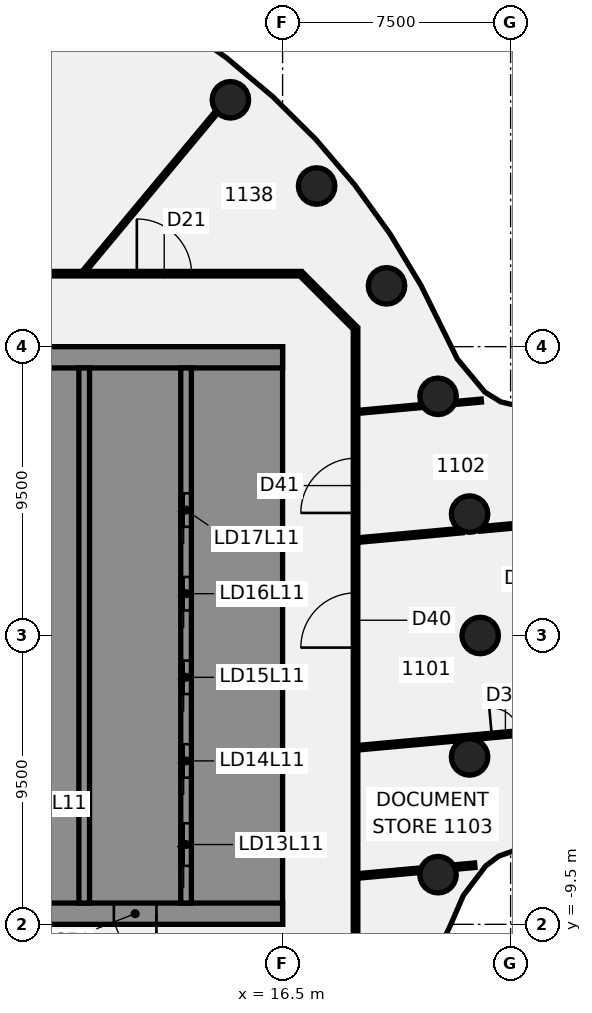
"""IFC4 building model, lengths in metres.
Left out: names, types, materials, properties, quantities, classifications, styles, units other than length and angle.
Written with IfcOpenShell. Run it as: python <this file> out.ifc"""

import sys

from ifc_helpers import new_model, si_unit, direction, frame, frame_2d, origin, origin_2d, place, context, subcontext, project, spatial, polyline, rectangle, circle, outline, extrude, element, fill, save


model = new_model("IFC4")
c1 = context("Model", 3, precision=1e-05, world=origin(), true_north=direction((0.0, 1.0)))
c2 = subcontext(c1, "Body", "Model", "MODEL_VIEW")
j1 = project(units=[si_unit("LENGTHUNIT", "METRE"), si_unit("PLANEANGLEUNIT", "RADIAN")], contexts=[c1])
p1 = place(None, origin())
s1 = spatial("IfcSite", under=j1, at=p1, CompositionType="ELEMENT")
p2 = place(p1, origin())
s2 = spatial("IfcBuilding", under=s1, at=p2, CompositionType="ELEMENT")
p3 = place(p2, frame((0.0, 0.0, 52.75)))
s3 = spatial("IfcBuildingStorey", under=s2, at=p3, CompositionType="ELEMENT", Elevation=52.75)
for number, where, z_axis, x_axis in (
    (1, (23.0, 0.0, -0.14), (0.0, 0.0, 1.0), (1.0, 0.0, 0.0)),
    (2, (22.651, 3.994, -0.14), (0.0, 0.0, 1.0), (1.0, 0.0, 0.0)),
    (3, (21.613, 7.866, -0.14), (0.0, 0.0, 1.0), (1.0, 0.0, 0.0)),
    (4, (19.919, 11.5, -0.14), (0.0, 0.0, 1.0), (1.0, 0.0, 0.0)),
    (5, (17.619, 14.784, -0.14), (0.0, 0.0, 1.0), (1.0, 0.0, 0.0)),
    (6, (14.784, 17.619, -0.14), (0.0, 0.0, 1.0), (1.0, 0.0, 0.0)),
    (7, (21.613, -7.866, -0.14), (0.0, 0.0, 1.0), (1.0, 0.0, 0.0)),
    (8, (22.651, -3.994, -0.14), (0.0, 0.0, 1.0), (1.0, 0.0, 0.0)),
):
    element("IfcColumn", number, at=place(p3, frame(where, z_axis=z_axis, x_axis=x_axis)), inside=s3, PredefinedType="COLUMN", context=c2, shape_type="SweptSolid", body=[
        extrude(circle(Radius=0.6, at=origin_2d()), origin(), (0.0, 0.0, 1.0), 3.75),
    ])
p4 = place(p3, frame((17.128, 11.872, 0.0), z_axis=(0.0, 0.0, 1.0), x_axis=(0.707106781187, -0.707106781187, 0.0)))
e9 = element("IfcWall", 9, at=p4, inside=s3, PredefinedType="PARTITIONING", context=c2, shape_type="SweptSolid", body=[
    extrude(rectangle(XDim=2.465, YDim=0.15, at=frame_2d((1.232, 0.0))), origin(), (0.0, 0.0, 1.0), 3.01),
])
p5 = place(p3, frame((-17.065, 11.9, 0.0), z_axis=(0.0, 0.0, 1.0), x_axis=(1.0, 0.0, 0.0)))
e10 = element("IfcWall", 10, at=p5, inside=s3, PredefinedType="PARTITIONING", context=c2, shape_type="SweptSolid", body=[
    extrude(rectangle(XDim=34.165, YDim=0.15, at=frame_2d((17.083, 0.0))), origin(), (0.0, 0.0, 1.0), 3.01),
])
p6 = place(p5, frame((17.124, 0.0, 0.0)))
e11 = element("IfcOpeningElement", 11, at=p6, cuts=e10, PredefinedType="OPENING", context=c2, shape_type="SweptSolid", body=[
    extrude(rectangle(XDim=1.8, YDim=2.1, at=frame_2d((0.9, 1.05))), frame((0.0, 0.085, 0.0), z_axis=(0.0, -1.0, 0.0), x_axis=(1.0, 0.0, 0.0)), (0.0, 0.0, 1.0), 0.17),
])
p7 = place(p5, frame((28.771, 0.0, 0.0)))
e12 = element("IfcOpeningElement", 12, at=p7, cuts=e10, PredefinedType="OPENING", context=c2, shape_type="SweptSolid", body=[
    extrude(rectangle(XDim=1.8, YDim=2.1, at=frame_2d((0.9, 1.05))), frame((0.0, 0.085, 0.0), z_axis=(0.0, -1.0, 0.0), x_axis=(1.0, 0.0, 0.0)), (0.0, 0.0, 1.0), 0.17),
])
p8 = place(p5, frame((6.52, 0.0, 0.0)))
e13 = element("IfcOpeningElement", 13, at=p8, cuts=e10, PredefinedType="OPENING", context=c2, shape_type="SweptSolid", body=[
    extrude(rectangle(XDim=1.8, YDim=2.1, at=frame_2d((0.9, 1.05))), frame((0.0, 0.085, 0.0), z_axis=(0.0, -1.0, 0.0), x_axis=(1.0, 0.0, 0.0)), (0.0, 0.0, 1.0), 0.17),
])
p9 = place(p3, frame((18.965, -3.692, 0.0), z_axis=(0.0, 0.0, 1.0), x_axis=(0.995841773556, 0.091099736772, 0.0)))
e14 = element("IfcWall", 14, at=p9, inside=s3, PredefinedType="PARTITIONING", context=c2, shape_type="SweptSolid", body=[
    extrude(rectangle(XDim=7.064, YDim=0.15, at=frame_2d((3.532, 0.0))), origin(), (0.0, 0.0, 1.0), 3.01),
])
p10 = place(p9, frame((4.435, 0.0, 0.0)))
e15 = element("IfcOpeningElement", 15, at=p10, cuts=e14, PredefinedType="OPENING", context=c2, shape_type="SweptSolid", body=[
    extrude(rectangle(XDim=0.9, YDim=2.1, at=frame_2d((0.45, 1.05))), frame((0.0, 0.085, 0.0), z_axis=(0.0, -1.0, 0.0), x_axis=(1.0, 0.0, 0.0)), (0.0, 0.0, 1.0), 0.17),
])
p11 = place(p3, frame((18.965, 3.137, 0.0), z_axis=(0.0, 0.0, 1.0), x_axis=(0.995850755629, 0.091001497317, 0.0)))
e16 = element("IfcWall", 16, at=p11, inside=s3, PredefinedType="PARTITIONING", context=c2, shape_type="SweptSolid", body=[
    extrude(rectangle(XDim=3.45, YDim=0.15, at=frame_2d((1.725, 0.0))), origin(), (0.0, 0.0, 1.0), 3.01),
])
p12 = place(p3, frame((22.995, 3.505, 0.0), z_axis=(0.0, 0.0, 1.0), x_axis=(0.995847961982, 0.091032063676, 0.0)))
e17 = element("IfcWall", 17, at=p12, inside=s3, PredefinedType="PARTITIONING", context=c2, shape_type="SweptSolid", body=[
    extrude(rectangle(XDim=2.395, YDim=0.15, at=frame_2d((1.198, 0.0))), origin(), (0.0, 0.0, 1.0), 3.01),
])
p13 = place(p3, frame((18.96, 7.354, 0.0), z_axis=(0.0, 0.0, 1.0), x_axis=(0.995829556648, 0.091233185336, 0.0)))
e18 = element("IfcWall", 18, at=p13, inside=s3, PredefinedType="PARTITIONING", context=c2, shape_type="SweptSolid", body=[
    extrude(rectangle(XDim=2.146, YDim=0.1, at=frame_2d((1.073, 0.0))), origin(), (0.0, 0.0, 1.0), 3.01),
])
p14 = place(p3, frame((22.164, 7.647, 0.0), z_axis=(0.0, 0.0, 1.0), x_axis=(0.995831241369, 0.091214794378, 0.0)))
e19 = element("IfcWall", 19, at=p14, inside=s3, PredefinedType="PARTITIONING", context=c2, shape_type="SweptSolid", body=[
    extrude(rectangle(XDim=0.875, YDim=0.1, at=frame_2d((0.438, 0.0))), origin(), (0.0, 0.0, 1.0), 3.01),
])
p15 = place(p3, frame((18.965, -7.909, 0.0), z_axis=(0.0, 0.0, 1.0), x_axis=(0.995837392729, 0.091147612376, 0.0)))
e20 = element("IfcWall", 20, at=p15, inside=s3, PredefinedType="PARTITIONING", context=c2, shape_type="SweptSolid", body=[
    extrude(rectangle(XDim=2.087, YDim=0.15, at=frame_2d((1.043, 0.0))), origin(), (0.0, 0.0, 1.0), 3.01),
])
p16 = place(p3, frame((22.156, -7.617, 0.0), z_axis=(0.0, 0.0, 1.0), x_axis=(0.995860226183, 0.090897799237, 0.0)))
e21 = element("IfcWall", 21, at=p16, inside=s3, PredefinedType="PARTITIONING", context=c2, shape_type="SweptSolid", body=[
    extrude(rectangle(XDim=0.669, YDim=0.15, at=frame_2d((0.334, 0.0))), origin(), (0.0, 0.0, 1.0), 3.01),
])
p17 = place(p3, frame((9.979, 11.988, 0.0), z_axis=(0.0, 0.0, 1.0), x_axis=(0.639768706711, 0.768567499907, 0.0)))
e22 = element("IfcWall", 22, at=p17, inside=s3, PredefinedType="PARTITIONING", context=c2, shape_type="SweptSolid", body=[
    extrude(rectangle(XDim=6.818, YDim=0.1, at=frame_2d((3.409, 0.0))), origin(), (0.0, 0.0, 1.0), 3.01),
])
p18 = place(p3, frame((18.9, -10.1, 0.0), z_axis=(0.0, 0.0, 1.0), x_axis=(0.0, 1.0, 0.0)))
e23 = element("IfcWall", 23, at=p18, inside=s3, PredefinedType="PARTITIONING", context=c2, shape_type="SweptSolid", body=[
    extrude(rectangle(XDim=20.2, YDim=0.15, at=frame_2d((10.1, 0.0))), origin(), (0.0, 0.0, 1.0), 3.01),
])
p19 = place(p18, frame((9.702, 0.0, 0.0)))
e24 = element("IfcOpeningElement", 24, at=p19, cuts=e23, PredefinedType="OPENING", context=c2, shape_type="SweptSolid", body=[
    extrude(rectangle(XDim=1.8, YDim=2.1, at=frame_2d((0.9, 1.05))), frame((0.0, 0.085, 0.0), z_axis=(0.0, -1.0, 0.0), x_axis=(1.0, 0.0, 0.0)), (0.0, 0.0, 1.0), 0.17),
])
p20 = place(p18, frame((14.131, 0.0, 0.0)))
e25 = element("IfcOpeningElement", 25, at=p20, cuts=e23, PredefinedType="OPENING", context=c2, shape_type="SweptSolid", body=[
    extrude(rectangle(XDim=1.8, YDim=2.1, at=frame_2d((0.9, 1.05))), frame((0.0, 0.085, 0.0), z_axis=(0.0, -1.0, 0.0), x_axis=(1.0, 0.0, 0.0)), (0.0, 0.0, 1.0), 0.17),
])
p21 = place(p3, frame((16.5, -9.15, 0.0), z_axis=(0.0, 0.0, 1.0), x_axis=(-1.0, 0.0, 0.0)))
e26 = element("IfcWall", 26, at=p21, inside=s3, PredefinedType="SHEAR", context=c2, shape_type="SweptSolid", body=[
    extrude(rectangle(XDim=13.0, YDim=0.7, at=frame_2d((6.5, 0.0))), origin(), (0.0, 0.0, 1.0), 3.61),
])
p22 = place(p21, frame((4.15, 0.0, 0.0)))
e27 = element("IfcOpeningElement", 27, at=p22, cuts=e26, PredefinedType="OPENING", context=c2, shape_type="SweptSolid", body=[
    extrude(rectangle(XDim=1.4, YDim=2.1, at=frame_2d((0.7, 1.05))), frame((0.0, 0.36, 0.0), z_axis=(0.0, -1.0, 0.0), x_axis=(1.0, 0.0, 0.0)), (0.0, 0.0, 1.0), 0.72),
])
p23 = place(p21, frame((10.125, 0.0, 0.0)))
e28 = element("IfcOpeningElement", 28, at=p23, cuts=e26, PredefinedType="OPENING", context=c2, shape_type="SweptSolid", body=[
    extrude(rectangle(XDim=1.4, YDim=2.1, at=frame_2d((0.7, 1.05))), frame((0.0, 0.36, 0.0), z_axis=(0.0, -1.0, 0.0), x_axis=(1.0, 0.0, 0.0)), (0.0, 0.0, 1.0), 0.72),
])
p24 = place(p3, origin())
e29 = element("IfcWall", 29, at=p24, inside=s3, PredefinedType="SHEAR", context=c2, shape_type="SweptSolid", body=[
    extrude(outline(polyline([(13.5, -8.8), (15.8, -8.8), (16.5, -8.8), (16.5, 8.8), (15.8, 8.8), (13.5, 8.8), (13.5, 8.125), (15.8, 8.125), (15.8, 5.625), (13.5, 5.625), (13.5, 5.375), (15.8, 5.375), (15.8, 2.875), (13.5, 2.875), (13.5, 2.625), (15.8, 2.625), (15.8, 0.125), (13.5, 0.125), (13.5, -0.125), (15.8, -0.125), (15.8, -2.625), (13.5, -2.625), (13.5, -2.875), (15.8, -2.875), (15.8, -5.375), (13.5, -5.375), (13.5, -5.625), (15.8, -5.625), (15.8, -8.125), (13.5, -8.125), (13.5, -8.8)])), origin(), (0.0, 0.0, 1.0), 3.61),
])
p25 = place(p3, frame((16.5, 9.15, 0.0), z_axis=(0.0, 0.0, 1.0), x_axis=(-1.0, 0.0, 0.0)))
e30 = element("IfcWall", 30, at=p25, inside=s3, PredefinedType="SHEAR", context=c2, shape_type="SweptSolid", body=[
    extrude(rectangle(XDim=13.0, YDim=0.7, at=frame_2d((6.5, 0.0))), origin(), (0.0, 0.0, 1.0), 3.61),
])
p26 = place(p3, origin())
e31 = element("IfcWall", 31, at=p26, inside=s3, PredefinedType="SHEAR", context=c2, shape_type="SweptSolid", body=[
    extrude(outline(polyline([(9.8, -5.375), (7.5, -5.375), (7.5, -2.875), (9.8, -2.875), (9.8, -2.625), (7.5, -2.625), (7.5, -0.125), (9.8, -0.125), (9.8, 0.125), (7.5, 0.125), (7.5, 2.625), (9.8, 2.625), (9.8, 2.875), (7.5, 2.875), (7.5, 5.375), (9.8, 5.375), (9.8, 5.625), (7.5, 5.625), (7.5, 8.125), (9.8, 8.125), (9.8, 8.8), (7.5, 8.8), (7.15, 8.8), (7.15, -5.625), (7.5, -5.625), (9.8, -5.625), (9.8, -5.375)])), origin(), (0.0, 0.0, 1.0), 3.61),
])
p27 = place(p3, origin())
e32 = element("IfcWall", 32, at=p27, inside=s3, PredefinedType="SHEAR", context=c2, shape_type="SweptSolid", body=[
    extrude(outline(polyline([(7.5, -8.125), (7.5, -8.8), (9.8, -8.8), (9.8, -8.125), (9.8, -5.625), (9.55, -5.625), (9.55, -8.125), (7.5, -8.125)])), origin(), (0.0, 0.0, 1.0), 3.61),
])
p28 = place(p3, frame((13.325, -8.8, 0.0), z_axis=(0.0, 0.0, 1.0), x_axis=(0.0, 1.0, 0.0)))
e33 = element("IfcWall", 33, at=p28, inside=s3, PredefinedType="SHEAR", context=c2, shape_type="SweptSolid", body=[
    extrude(rectangle(XDim=17.6, YDim=0.35, at=frame_2d((8.8, 0.0))), origin(), (0.0, 0.0, 1.0), 3.61),
])
p29 = place(p28, frame((1.225, 0.0, 0.0)))
e34 = element("IfcOpeningElement", 34, at=p29, cuts=e33, PredefinedType="OPENING", context=c2, shape_type="SweptSolid", body=[
    extrude(rectangle(XDim=1.4, YDim=2.1, at=frame_2d((0.7, 1.05))), frame((0.0, 0.185, 0.0), z_axis=(0.0, -1.0, 0.0), x_axis=(1.0, 0.0, 0.0)), (0.0, 0.0, 1.0), 0.37),
])
p30 = place(p28, frame((4.125, 0.0, 0.0)))
e35 = element("IfcOpeningElement", 35, at=p30, cuts=e33, PredefinedType="OPENING", context=c2, shape_type="SweptSolid", body=[
    extrude(rectangle(XDim=1.1, YDim=2.1, at=frame_2d((0.55, 1.05))), frame((0.0, 0.185, 0.0), z_axis=(0.0, -1.0, 0.0), x_axis=(1.0, 0.0, 0.0)), (0.0, 0.0, 1.0), 0.37),
])
p31 = place(p28, frame((6.875, 0.0, 0.0)))
e36 = element("IfcOpeningElement", 36, at=p31, cuts=e33, PredefinedType="OPENING", context=c2, shape_type="SweptSolid", body=[
    extrude(rectangle(XDim=1.1, YDim=2.1, at=frame_2d((0.55, 1.05))), frame((0.0, 0.185, 0.0), z_axis=(0.0, -1.0, 0.0), x_axis=(1.0, 0.0, 0.0)), (0.0, 0.0, 1.0), 0.37),
])
p32 = place(p28, frame((9.625, 0.0, 0.0)))
e37 = element("IfcOpeningElement", 37, at=p32, cuts=e33, PredefinedType="OPENING", context=c2, shape_type="SweptSolid", body=[
    extrude(rectangle(XDim=1.1, YDim=2.1, at=frame_2d((0.55, 1.05))), frame((0.0, 0.185, 0.0), z_axis=(0.0, -1.0, 0.0), x_axis=(1.0, 0.0, 0.0)), (0.0, 0.0, 1.0), 0.37),
])
p33 = place(p28, frame((12.375, 0.0, 0.0)))
e38 = element("IfcOpeningElement", 38, at=p33, cuts=e33, PredefinedType="OPENING", context=c2, shape_type="SweptSolid", body=[
    extrude(rectangle(XDim=1.1, YDim=2.1, at=frame_2d((0.55, 1.05))), frame((0.0, 0.185, 0.0), z_axis=(0.0, -1.0, 0.0), x_axis=(1.0, 0.0, 0.0)), (0.0, 0.0, 1.0), 0.37),
])
p34 = place(p3, frame((9.975, -8.8, 0.0), z_axis=(0.0, 0.0, 1.0), x_axis=(0.0, 1.0, 0.0)))
e39 = element("IfcWall", 39, at=p34, inside=s3, PredefinedType="SHEAR", context=c2, shape_type="SweptSolid", body=[
    extrude(rectangle(XDim=17.6, YDim=0.35, at=frame_2d((8.8, 0.0))), origin(), (0.0, 0.0, 1.0), 3.61),
])
p35 = place(p7, origin())
e40 = element("IfcDoor", 40, at=p35, inside=s3, OperationType="DOUBLE_DOOR_SINGLE_SWING", PredefinedType="DOOR", context=c2, shape_type="SweptSolid", body=[
    extrude(rectangle(XDim=1.8, YDim=2.1, at=frame_2d((0.9, 1.05))), frame((0.0, 0.025, 0.0), z_axis=(0.0, -1.0, 0.0), x_axis=(1.0, 0.0, 0.0)), (0.0, 0.0, 1.0), 0.05),
])
fill(e12, e40)
p36 = place(p10, frame((0.9, 0.0, 0.0), z_axis=(0.0, 0.0, 1.0), x_axis=(-1.0, 0.0, 0.0)))
e41 = element("IfcDoor", 41, at=p36, inside=s3, OperationType="SINGLE_SWING_RIGHT", PredefinedType="DOOR", context=c2, shape_type="SweptSolid", body=[
    extrude(rectangle(XDim=0.9, YDim=2.1, at=frame_2d((0.45, 1.05))), frame((0.0, 0.025, 0.0), z_axis=(0.0, -1.0, 0.0), x_axis=(1.0, 0.0, 0.0)), (0.0, 0.0, 1.0), 0.05),
])
fill(e15, e41)
p37 = place(p19, origin())
e42 = element("IfcDoor", 42, at=p37, inside=s3, OperationType="DOUBLE_DOOR_SINGLE_SWING", PredefinedType="DOOR", context=c2, shape_type="SweptSolid", body=[
    extrude(rectangle(XDim=1.8, YDim=2.1, at=frame_2d((0.9, 1.05))), frame((0.0, 0.025, 0.0), z_axis=(0.0, -1.0, 0.0), x_axis=(1.0, 0.0, 0.0)), (0.0, 0.0, 1.0), 0.05),
])
fill(e24, e42)
p38 = place(p20, frame((1.8, 0.0, 0.0), z_axis=(0.0, 0.0, 1.0), x_axis=(-1.0, 0.0, 0.0)))
e43 = element("IfcDoor", 43, at=p38, inside=s3, OperationType="DOUBLE_DOOR_SINGLE_SWING", PredefinedType="DOOR", context=c2, shape_type="SweptSolid", body=[
    extrude(rectangle(XDim=1.8, YDim=2.1, at=frame_2d((0.9, 1.05))), frame((0.0, 0.025, 0.0), z_axis=(0.0, -1.0, 0.0), x_axis=(1.0, 0.0, 0.0)), (0.0, 0.0, 1.0), 0.05),
])
fill(e25, e43)
p39 = place(p22, origin())
e44 = element("IfcDoor", 44, at=p39, inside=s3, OperationType="SINGLE_SWING_LEFT", PredefinedType="DOOR", context=c2, shape_type="SweptSolid", body=[
    extrude(rectangle(XDim=1.4, YDim=2.1, at=frame_2d((0.7, 1.05))), frame((0.0, 0.025, 0.0), z_axis=(0.0, -1.0, 0.0), x_axis=(1.0, 0.0, 0.0)), (0.0, 0.0, 1.0), 0.05),
])
fill(e27, e44)
p40 = place(p29, origin())
e45 = element("IfcDoor", 45, at=p40, inside=s3, OperationType="SLIDING_TO_LEFT", PredefinedType="DOOR", context=c2, shape_type="SweptSolid", body=[
    extrude(rectangle(XDim=1.4, YDim=2.1, at=frame_2d((0.7, 1.05))), frame((0.0, 0.025, 0.0), z_axis=(0.0, -1.0, 0.0), x_axis=(1.0, 0.0, 0.0)), (0.0, 0.0, 1.0), 0.05),
])
fill(e34, e45)
p41 = place(p30, origin())
e46 = element("IfcDoor", 46, at=p41, inside=s3, OperationType="SLIDING_TO_LEFT", PredefinedType="DOOR", context=c2, shape_type="SweptSolid", body=[
    extrude(rectangle(XDim=1.1, YDim=2.1, at=frame_2d((0.55, 1.05))), frame((0.0, 0.025, 0.0), z_axis=(0.0, -1.0, 0.0), x_axis=(1.0, 0.0, 0.0)), (0.0, 0.0, 1.0), 0.05),
])
fill(e35, e46)
p42 = place(p31, origin())
e47 = element("IfcDoor", 47, at=p42, inside=s3, OperationType="SLIDING_TO_LEFT", PredefinedType="DOOR", context=c2, shape_type="SweptSolid", body=[
    extrude(rectangle(XDim=1.1, YDim=2.1, at=frame_2d((0.55, 1.05))), frame((0.0, 0.025, 0.0), z_axis=(0.0, -1.0, 0.0), x_axis=(1.0, 0.0, 0.0)), (0.0, 0.0, 1.0), 0.05),
])
fill(e36, e47)
p43 = place(p32, origin())
e48 = element("IfcDoor", 48, at=p43, inside=s3, OperationType="SLIDING_TO_LEFT", PredefinedType="DOOR", context=c2, shape_type="SweptSolid", body=[
    extrude(rectangle(XDim=1.1, YDim=2.1, at=frame_2d((0.55, 1.05))), frame((0.0, 0.025, 0.0), z_axis=(0.0, -1.0, 0.0), x_axis=(1.0, 0.0, 0.0)), (0.0, 0.0, 1.0), 0.05),
])
fill(e37, e48)
p44 = place(p33, origin())
e49 = element("IfcDoor", 49, at=p44, inside=s3, OperationType="SLIDING_TO_LEFT", PredefinedType="DOOR", context=c2, shape_type="SweptSolid", body=[
    extrude(rectangle(XDim=1.1, YDim=2.1, at=frame_2d((0.55, 1.05))), frame((0.0, 0.025, 0.0), z_axis=(0.0, -1.0, 0.0), x_axis=(1.0, 0.0, 0.0)), (0.0, 0.0, 1.0), 0.05),
])
fill(e38, e49)
save(model, sys.argv[1])
